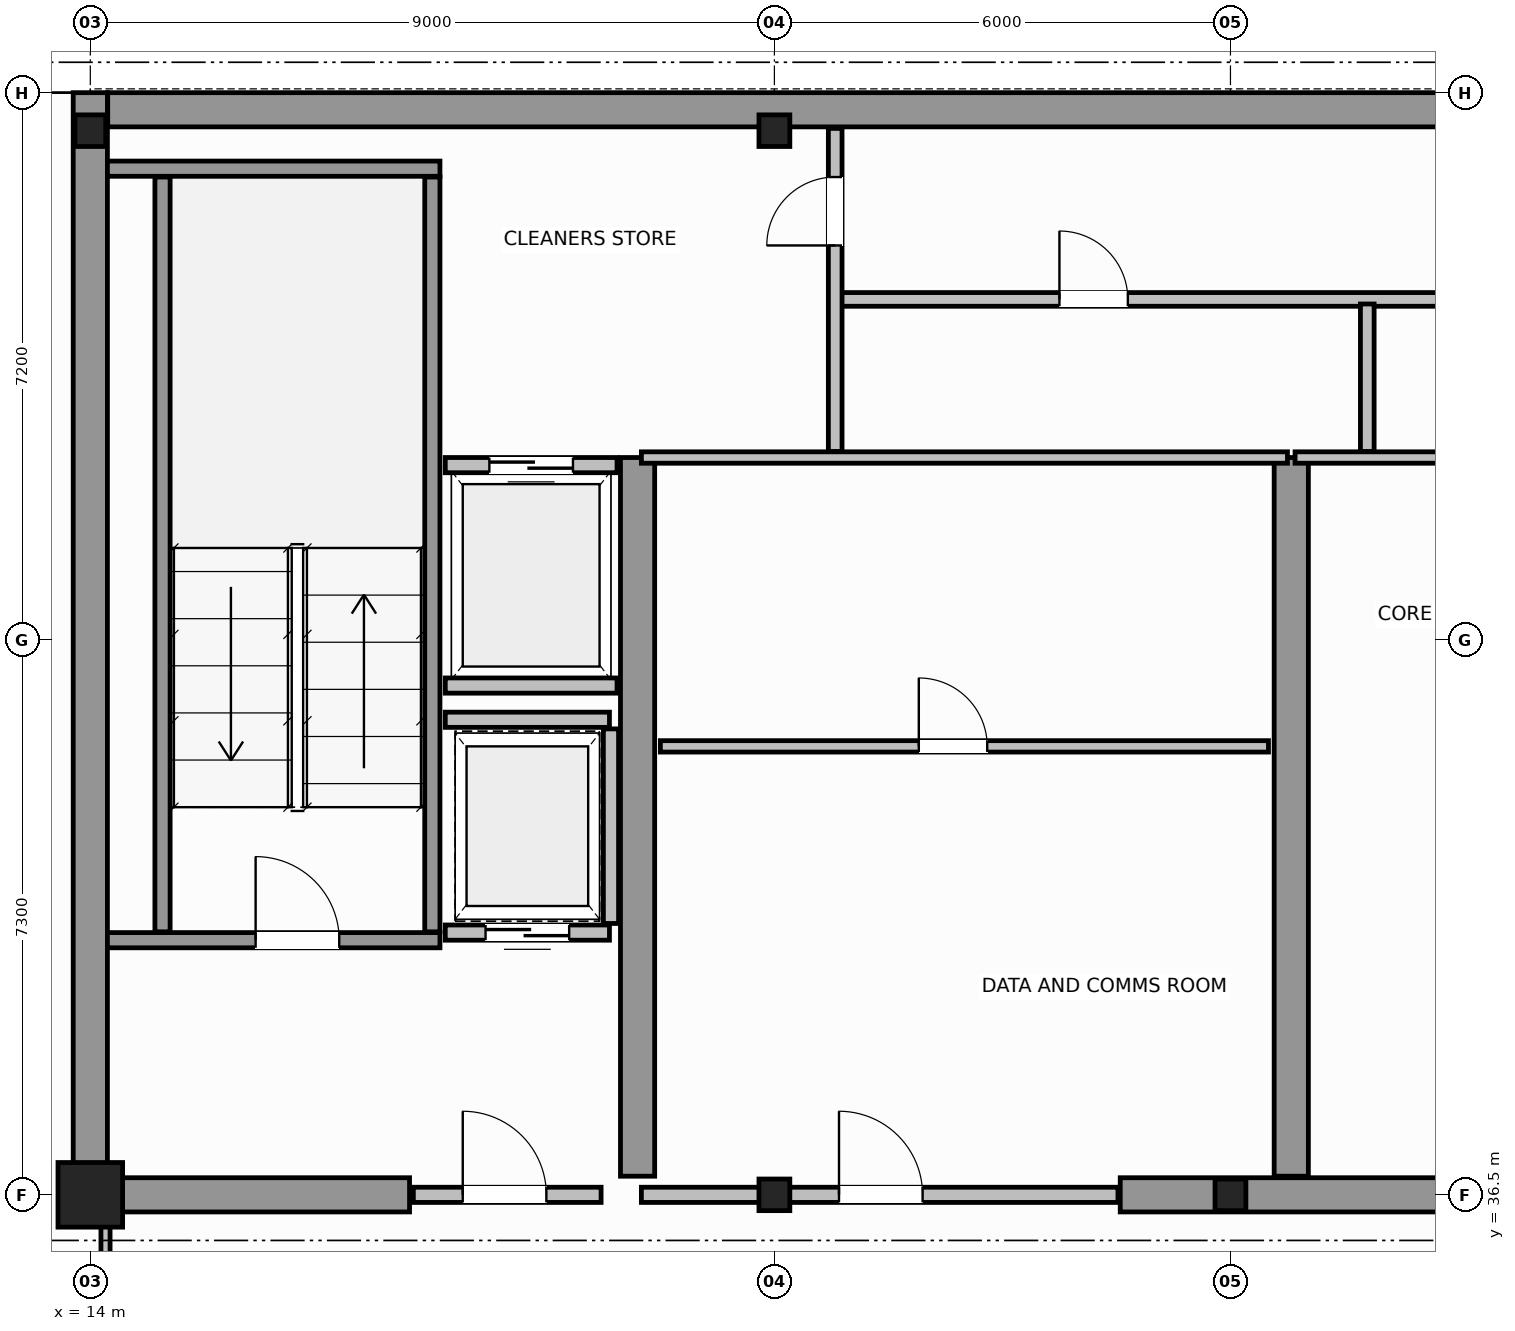
"""IFC4 building model, lengths in metres.
Left out: names, types, materials, properties, quantities, classifications, styles, units other than length and angle.
Written with IfcOpenShell. Run it as: python <this file> out.ifc"""

import sys

from ifc_helpers import new_model, si_unit, direction, frame, frame_2d, origin, origin_2d, place, context, subcontext, project, spatial, rectangle, i_section, extrude, source, transform, mapped, element, fill, save


model = new_model("IFC4")
c1 = context("Model", 3, precision=1e-05, world=origin(), true_north=direction((0.0, 1.0)))
c2 = subcontext(c1, "Body", "Model", "MODEL_VIEW")
j1 = project(units=[si_unit("LENGTHUNIT", "METRE"), si_unit("PLANEANGLEUNIT", "RADIAN")], contexts=[c1])
p1 = place(None, origin())
s1 = spatial("IfcSite", under=j1, at=p1, CompositionType="ELEMENT")
p2 = place(p1, origin())
s2 = spatial("IfcBuilding", under=s1, at=p2, CompositionType="ELEMENT")
p3 = place(p2, frame((0.0, 0.0, 291.6)))
s3 = spatial("IfcBuildingStorey", under=s2, at=p3, CompositionType="ELEMENT", Elevation=291.6)
m1 = source(origin(), c2, "Body", "SweptSolid", [
    extrude(rectangle(XDim=0.85, YDim=0.85, at=origin_2d()), origin(), (0.0, 0.0, 1.0), 3.8),
])
p4 = place(p3, frame((14.0, 36.5, 0.0), z_axis=(0.0, 0.0, 1.0), x_axis=(1.0, 0.0, 0.0)))
e1 = element("IfcColumn", 1, at=p4, inside=s3, PredefinedType="COLUMN", context=c2, shape_type="MappedRepresentation", body=[
    mapped(m1, transform((0.0, 0.0, 0.0), scale=1.0)),
])
m2 = source(origin(), c2, "Body", "SweptSolid", [
    extrude(i_section(OverallWidth=0.406, OverallDepth=0.416, WebThickness=0.03, FlangeThickness=0.042, FilletRadius=0.015, at=origin_2d()), origin(), (0.0, 0.0, 1.0), 3.8),
])
for number, where, z_axis, x_axis in (
    (2, (23.0, 36.5, 0.0), (0.0, 0.0, 1.0), (1.0, 0.0, 0.0)),
    (3, (29.0, 36.5, 0.0), (0.0, 0.0, 1.0), (1.0, 0.0, 0.0)),
    (4, (14.0, 50.5, 0.0), (0.0, 0.0, 1.0), (1.0, 0.0, 0.0)),
    (5, (23.0, 50.5, 0.0), (0.0, 0.0, 1.0), (1.0, 0.0, 0.0)),
):
    element("IfcColumn", number, at=place(p3, frame(where, z_axis=z_axis, x_axis=x_axis)), inside=s3, PredefinedType="COLUMN", context=c2, shape_type="MappedRepresentation", body=[
        mapped(m2, transform((0.0, 0.0, 0.0), scale=1.0)),
    ])
p5 = place(p3, frame((14.229, 50.775, 0.0), z_axis=(0.0, 0.0, 1.0), x_axis=(1.0, 0.0, 0.0)))
e6 = element("IfcWall", 6, at=p5, inside=s3, PredefinedType="SHEAR", context=c2, shape_type="SweptSolid", body=[
    extrude(rectangle(XDim=19.769, YDim=0.45, at=frame_2d((9.885, 0.0))), origin(), (0.0, 0.0, 1.0), 3.8),
])
p6 = place(p3, frame((14.0, 36.5, 0.0), z_axis=(0.0, 0.0, 1.0), x_axis=(0.0, 1.0, 0.0)))
e7 = element("IfcWall", 7, at=p6, inside=s3, PredefinedType="SHEAR", context=c2, shape_type="SweptSolid", body=[
    extrude(rectangle(XDim=14.5, YDim=0.45, at=frame_2d((7.25, 0.0))), origin(), (0.0, 0.0, 1.0), 3.8),
])
p7 = place(p3, frame((14.245, 36.5, 0.0), z_axis=(0.0, 0.0, 1.0), x_axis=(1.0, 0.0, 0.0)))
e8 = element("IfcWall", 8, at=p7, inside=s3, PredefinedType="SHEAR", context=c2, shape_type="SweptSolid", body=[
    extrude(rectangle(XDim=3.955, YDim=0.45, at=frame_2d((1.978, 0.0))), origin(), (0.0, 0.0, 1.0), 2.58),
])
p8 = place(p3, frame((27.55, 36.5, 0.0), z_axis=(0.0, 0.0, 1.0), x_axis=(1.0, 0.0, 0.0)))
e9 = element("IfcWall", 9, at=p8, inside=s3, PredefinedType="SHEAR", context=c2, shape_type="SweptSolid", body=[
    extrude(rectangle(XDim=4.5, YDim=0.45, at=frame_2d((2.25, 0.0))), origin(), (0.0, 0.0, 1.0), 3.8),
])
for number, where, z_axis, x_axis in (
    (10, (21.2, 36.745, 0.0), (0.0, 0.0, 1.0), (0.0, 1.0, 0.0)),
    (11, (29.8, 36.745, 0.0), (0.0, 0.0, 1.0), (0.0, 1.0, 0.0)),
):
    element("IfcWall", number, at=place(p3, frame(where, z_axis=z_axis, x_axis=x_axis)), inside=s3, PredefinedType="SHEAR", context=c2, shape_type="SweptSolid", body=[
        extrude(rectangle(XDim=9.455, YDim=0.45, at=frame_2d((4.728, 0.0))), origin(), (0.0, 0.0, 1.0), 3.8),
    ])
p9 = place(p3, frame((14.225, 39.85, 0.0), z_axis=(0.0, 0.0, 1.0), x_axis=(1.0, 0.0, 0.0)))
e12 = element("IfcWall", 12, at=p9, inside=s3, PredefinedType="SOLIDWALL", context=c2, shape_type="SweptSolid", body=[
    extrude(rectangle(XDim=4.375, YDim=0.2, at=frame_2d((2.188, 0.0))), origin(), (0.0, 0.0, 1.0), 3.8),
])
p10 = place(p9, frame((1.95, 0.0, 0.0)))
e13 = element("IfcOpeningElement", 13, at=p10, cuts=e12, PredefinedType="OPENING", context=c2, shape_type="SweptSolid", body=[
    extrude(rectangle(XDim=1.1, YDim=2.15, at=frame_2d((0.55, 1.075))), frame((0.0, 0.11, 0.0), z_axis=(0.0, -1.0, 0.0), x_axis=(1.0, 0.0, 0.0)), (0.0, 0.0, 1.0), 0.22),
])
p11 = place(p3, frame((14.225, 50.0, 0.0), z_axis=(0.0, 0.0, 1.0), x_axis=(1.0, 0.0, 0.0)))
e14 = element("IfcWall", 14, at=p11, inside=s3, PredefinedType="SOLIDWALL", context=c2, shape_type="SweptSolid", body=[
    extrude(rectangle(XDim=4.375, YDim=0.2, at=frame_2d((2.188, 0.0))), origin(), (0.0, 0.0, 1.0), 3.8),
])
for number, where, z_axis, x_axis in (
    (15, (14.95, 39.96, 0.0), (0.0, 0.0, 1.0), (0.0, 1.0, 0.0)),
    (16, (18.5, 39.96, 0.0), (0.0, 0.0, 1.0), (0.0, 1.0, 0.0)),
):
    element("IfcWall", number, at=place(p3, frame(where, z_axis=z_axis, x_axis=x_axis)), inside=s3, PredefinedType="SOLIDWALL", context=c2, shape_type="SweptSolid", body=[
        extrude(rectangle(XDim=9.93, YDim=0.2, at=frame_2d((4.965, 0.0))), origin(), (0.0, 0.0, 1.0), 3.8),
    ])
p12 = place(p3, frame((18.25, 36.5, 0.0), z_axis=(0.0, 0.0, 1.0), x_axis=(1.0, 0.0, 0.0)))
e17 = element("IfcWall", 17, at=p12, inside=s3, PredefinedType="SOLIDWALL", context=c2, shape_type="SweptSolid", body=[
    extrude(rectangle(XDim=2.47, YDim=0.2, at=frame_2d((1.235, 0.0))), origin(), (0.0, 0.0, 1.0), 2.57),
])
p13 = place(p12, frame((0.65, 0.0, 0.0)))
e18 = element("IfcOpeningElement", 18, at=p13, cuts=e17, PredefinedType="OPENING", context=c2, shape_type="SweptSolid", body=[
    extrude(rectangle(XDim=1.1, YDim=2.15, at=frame_2d((0.55, 1.075))), frame((0.0, 0.11, 0.0), z_axis=(0.0, -1.0, 0.0), x_axis=(1.0, 0.0, 0.0)), (0.0, 0.0, 1.0), 0.22),
])
p14 = place(p3, frame((18.67, 46.1, 0.0), z_axis=(0.0, 0.0, 1.0), x_axis=(1.0, 0.0, 0.0)))
e19 = element("IfcWall", 19, at=p14, inside=s3, PredefinedType="SOLIDWALL", context=c2, shape_type="SweptSolid", body=[
    extrude(rectangle(XDim=2.26, YDim=0.2, at=frame_2d((1.13, 0.0))), origin(), (0.0, 0.0, 1.0), 3.58),
])
p15 = place(p14, frame((0.58, 0.0, 0.0)))
e20 = element("IfcOpeningElement", 20, at=p15, cuts=e19, PredefinedType="OPENING", context=c2, shape_type="SweptSolid", body=[
    extrude(rectangle(XDim=1.1, YDim=2.15, at=frame_2d((0.55, 1.075))), frame((0.0, 0.11, 0.0), z_axis=(0.0, -1.0, 0.0), x_axis=(1.0, 0.0, 0.0)), (0.0, 0.0, 1.0), 0.22),
])
p16 = place(p3, frame((18.67, 43.2, 0.0), z_axis=(0.0, 0.0, 1.0), x_axis=(1.0, 0.0, 0.0)))
e21 = element("IfcWall", 21, at=p16, inside=s3, PredefinedType="SOLIDWALL", context=c2, shape_type="SweptSolid", body=[
    extrude(rectangle(XDim=2.26, YDim=0.2, at=frame_2d((1.13, 0.0))), origin(), (0.0, 0.0, 1.0), 3.58),
])
p17 = place(p3, frame((18.67, 39.95, 0.0), z_axis=(0.0, 0.0, 1.0), x_axis=(1.0, 0.0, 0.0)))
e22 = element("IfcWall", 22, at=p17, inside=s3, PredefinedType="SOLIDWALL", context=c2, shape_type="SweptSolid", body=[
    extrude(rectangle(XDim=2.16, YDim=0.2, at=frame_2d((1.08, 0.0))), origin(), (0.0, 0.0, 1.0), 3.58),
])
p18 = place(p17, frame((0.53, 0.0, 0.0)))
e23 = element("IfcOpeningElement", 23, at=p18, cuts=e22, PredefinedType="OPENING", context=c2, shape_type="SweptSolid", body=[
    extrude(rectangle(XDim=1.1, YDim=2.15, at=frame_2d((0.55, 1.075))), frame((0.0, 0.11, 0.0), z_axis=(0.0, -1.0, 0.0), x_axis=(1.0, 0.0, 0.0)), (0.0, 0.0, 1.0), 0.22),
])
p19 = place(p3, frame((18.67, 42.75, 0.0), z_axis=(0.0, 0.0, 1.0), x_axis=(1.0, 0.0, 0.0)))
e24 = element("IfcWall", 24, at=p19, inside=s3, PredefinedType="SOLIDWALL", context=c2, shape_type="SweptSolid", body=[
    extrude(rectangle(XDim=2.16, YDim=0.2, at=frame_2d((1.08, 0.0))), origin(), (0.0, 0.0, 1.0), 3.58),
])
p20 = place(p3, frame((20.85, 40.07, 0.0), z_axis=(0.0, 0.0, 1.0), x_axis=(0.0, 1.0, 0.0)))
e25 = element("IfcWall", 25, at=p20, inside=s3, PredefinedType="SOLIDWALL", context=c2, shape_type="SweptSolid", body=[
    extrude(rectangle(XDim=2.56, YDim=0.2, at=frame_2d((1.28, 0.0))), origin(), (0.0, 0.0, 1.0), 3.58),
])
p21 = place(p3, frame((21.25, 36.5, 0.0), z_axis=(0.0, 0.0, 1.0), x_axis=(1.0, 0.0, 0.0)))
e26 = element("IfcWall", 26, at=p21, inside=s3, PredefinedType="SOLIDWALL", context=c2, shape_type="SweptSolid", body=[
    extrude(rectangle(XDim=6.27, YDim=0.2, at=frame_2d((3.135, 0.0))), origin(), (0.0, 0.0, 1.0), 2.57),
])
p22 = place(p21, frame((2.6, 0.0, 0.0)))
e27 = element("IfcOpeningElement", 27, at=p22, cuts=e26, PredefinedType="OPENING", context=c2, shape_type="SweptSolid", body=[
    extrude(rectangle(XDim=1.1, YDim=2.15, at=frame_2d((0.55, 1.075))), frame((0.0, 0.11, 0.0), z_axis=(0.0, -1.0, 0.0), x_axis=(1.0, 0.0, 0.0)), (0.0, 0.0, 1.0), 0.22),
])
p23 = place(p3, frame((21.25, 46.2, 0.0), z_axis=(0.0, 0.0, 1.0), x_axis=(1.0, 0.0, 0.0)))
e28 = element("IfcWall", 28, at=p23, inside=s3, PredefinedType="PARTITIONING", context=c2, shape_type="SweptSolid", body=[
    extrude(rectangle(XDim=8.5, YDim=0.15, at=frame_2d((4.25, 0.0))), origin(), (0.0, 0.0, 1.0), 3.58),
])
p24 = place(p3, frame((21.5, 42.4, 0.0), z_axis=(0.0, 0.0, 1.0), x_axis=(1.0, 0.0, 0.0)))
e29 = element("IfcWall", 29, at=p24, inside=s3, PredefinedType="PARTITIONING", context=c2, shape_type="SweptSolid", body=[
    extrude(rectangle(XDim=8.0, YDim=0.15, at=frame_2d((4.0, 0.0))), origin(), (0.0, 0.0, 1.0), 3.58),
])
p25 = place(p24, frame((3.4, 0.0, 0.0)))
e30 = element("IfcOpeningElement", 30, at=p25, cuts=e29, PredefinedType="OPENING", context=c2, shape_type="SweptSolid", body=[
    extrude(rectangle(XDim=0.9, YDim=2.1, at=frame_2d((0.45, 1.05))), frame((0.0, 0.085, 0.0), z_axis=(0.0, -1.0, 0.0), x_axis=(1.0, 0.0, 0.0)), (0.0, 0.0, 1.0), 0.17),
])
p26 = place(p3, frame((29.85, 46.2, 0.0), z_axis=(0.0, 0.0, 1.0), x_axis=(1.0, 0.0, 0.0)))
e31 = element("IfcWall", 31, at=p26, inside=s3, PredefinedType="PARTITIONING", context=c2, shape_type="SweptSolid", body=[
    extrude(rectangle(XDim=8.5, YDim=0.15, at=frame_2d((4.25, 0.0))), origin(), (0.0, 0.0, 1.0), 3.58),
])
p27 = place(p3, frame((23.85, 48.28, 0.0), z_axis=(0.0, 0.0, 1.0), x_axis=(1.0, 0.0, 0.0)))
e32 = element("IfcWall", 32, at=p27, inside=s3, PredefinedType="PLUMBINGWALL", context=c2, shape_type="SweptSolid", body=[
    extrude(rectangle(XDim=15.03, YDim=0.18, at=frame_2d((7.515, 0.0))), origin(), (0.0, 0.0, 1.0), 3.58),
])
p28 = place(p27, frame((2.9, 0.0, 0.0)))
e33 = element("IfcOpeningElement", 33, at=p28, cuts=e32, PredefinedType="OPENING", context=c2, shape_type="SweptSolid", body=[
    extrude(rectangle(XDim=0.9, YDim=2.15, at=frame_2d((0.45, 1.075))), frame((0.0, 0.1, 0.0), z_axis=(0.0, -1.0, 0.0), x_axis=(1.0, 0.0, 0.0)), (0.0, 0.0, 1.0), 0.2),
])
p29 = place(p27, frame((10.4, 0.0, 0.0)))
e34 = element("IfcOpeningElement", 34, at=p29, cuts=e32, PredefinedType="OPENING", context=c2, shape_type="SweptSolid", body=[
    extrude(rectangle(XDim=0.9, YDim=2.15, at=frame_2d((0.45, 1.075))), frame((0.0, 0.1, 0.0), z_axis=(0.0, -1.0, 0.0), x_axis=(1.0, 0.0, 0.0)), (0.0, 0.0, 1.0), 0.2),
])
p30 = place(p3, frame((23.8, 46.28, 0.0), z_axis=(0.0, 0.0, 1.0), x_axis=(0.0, 1.0, 0.0)))
e35 = element("IfcWall", 35, at=p30, inside=s3, PredefinedType="PLUMBINGWALL", context=c2, shape_type="SweptSolid", body=[
    extrude(rectangle(XDim=4.25, YDim=0.18, at=frame_2d((2.125, 0.0))), origin(), (0.0, 0.0, 1.0), 3.58),
])
p31 = place(p30, frame((2.71, 0.0, 0.0)))
e36 = element("IfcOpeningElement", 36, at=p31, cuts=e35, PredefinedType="OPENING", context=c2, shape_type="SweptSolid", body=[
    extrude(rectangle(XDim=0.9, YDim=2.15, at=frame_2d((0.45, 1.075))), frame((0.0, 0.1, 0.0), z_axis=(0.0, -1.0, 0.0), x_axis=(1.0, 0.0, 0.0)), (0.0, 0.0, 1.0), 0.2),
])
p32 = place(p3, frame((30.8, 46.28, 0.0), z_axis=(0.0, 0.0, 1.0), x_axis=(0.0, 1.0, 0.0)))
e37 = element("IfcWall", 37, at=p32, inside=s3, PredefinedType="PLUMBINGWALL", context=c2, shape_type="SweptSolid", body=[
    extrude(rectangle(XDim=1.94, YDim=0.18, at=frame_2d((0.97, 0.0))), origin(), (0.0, 0.0, 1.0), 3.58),
])
p33 = place(p3, frame((14.2, 34.0, 0.0), z_axis=(0.0, 0.0, 1.0), x_axis=(0.0, 1.0, 0.0)))
e38 = element("IfcWall", 38, at=p33, inside=s3, PredefinedType="PARTITIONING", context=c2, shape_type="SweptSolid", body=[
    extrude(rectangle(XDim=2.44, YDim=0.12, at=frame_2d((1.22, 0.0))), origin(), (0.0, 0.0, 1.0), 3.58),
])
p34 = place(p33, frame((0.7, 0.0, 0.0)))
e39 = element("IfcOpeningElement", 39, at=p34, cuts=e38, PredefinedType="OPENING", context=c2, shape_type="SweptSolid", body=[
    extrude(rectangle(XDim=0.9, YDim=2.15, at=frame_2d((0.45, 1.075))), frame((0.0, 0.07, 0.0), z_axis=(0.0, -1.0, 0.0), x_axis=(1.0, 0.0, 0.0)), (0.0, 0.0, 1.0), 0.14),
])
m3 = source(origin(), c2, "Body", "SweptSolid", [
    extrude(rectangle(XDim=1.1, YDim=2.15, at=frame_2d((0.55, 1.075))), frame((0.0, 0.025, 0.0), z_axis=(0.0, -1.0, 0.0), x_axis=(1.0, 0.0, 0.0)), (0.0, 0.0, 1.0), 0.05),
])
p35 = place(p10, origin())
e40 = element("IfcDoor", 40, at=p35, inside=s3, OperationType="SINGLE_SWING_LEFT", PredefinedType="DOOR", context=c2, shape_type="MappedRepresentation", body=[
    mapped(m3, transform((0.0, 0.0, 0.0), scale=1.0)),
])
fill(e13, e40)
p36 = place(p13, origin())
e41 = element("IfcDoor", 41, at=p36, inside=s3, OperationType="SINGLE_SWING_RIGHT", PredefinedType="DOOR", context=c2, shape_type="MappedRepresentation", body=[
    mapped(m3, transform((0.0, 0.0, 0.0), scale=1.0)),
])
fill(e18, e41)
p37 = place(p15, origin())
e42 = element("IfcDoor", 42, at=p37, inside=s3, OperationType="DOUBLE_DOOR_SLIDING", PredefinedType="DOOR", context=c2, shape_type="MappedRepresentation", body=[
    mapped(m3, transform((0.0, 0.0, 0.0), scale=1.0)),
])
fill(e20, e42)
p38 = place(p18, origin())
e43 = element("IfcDoor", 43, at=p38, inside=s3, OperationType="DOUBLE_DOOR_SLIDING", PredefinedType="DOOR", context=c2, shape_type="MappedRepresentation", body=[
    mapped(m3, transform((0.0, 0.0, 0.0), scale=1.0)),
])
fill(e23, e43)
p39 = place(p22, origin())
e44 = element("IfcDoor", 44, at=p39, inside=s3, OperationType="SINGLE_SWING_LEFT", PredefinedType="DOOR", context=c2, shape_type="MappedRepresentation", body=[
    mapped(m3, transform((0.0, 0.0, 0.0), scale=1.0)),
])
fill(e27, e44)
m4 = source(origin(), c2, "Body", "SweptSolid", [
    extrude(rectangle(XDim=0.9, YDim=2.1, at=frame_2d((0.45, 1.05))), frame((0.0, 0.025, 0.0), z_axis=(0.0, -1.0, 0.0), x_axis=(1.0, 0.0, 0.0)), (0.0, 0.0, 1.0), 0.05),
])
p40 = place(p25, origin())
e45 = element("IfcDoor", 45, at=p40, inside=s3, OperationType="SINGLE_SWING_RIGHT", PredefinedType="DOOR", context=c2, shape_type="MappedRepresentation", body=[
    mapped(m4, transform((0.0, 0.0, 0.0), scale=1.0)),
])
fill(e30, e45)
m5 = source(origin(), c2, "Body", "SweptSolid", [
    extrude(rectangle(XDim=0.9, YDim=2.15, at=frame_2d((0.45, 1.075))), frame((0.0, 0.025, 0.0), z_axis=(0.0, -1.0, 0.0), x_axis=(1.0, 0.0, 0.0)), (0.0, 0.0, 1.0), 0.05),
])
p41 = place(p31, origin())
e46 = element("IfcDoor", 46, at=p41, inside=s3, OperationType="SINGLE_SWING_LEFT", PredefinedType="DOOR", context=c2, shape_type="MappedRepresentation", body=[
    mapped(m5, transform((0.0, 0.0, 0.0), scale=1.0)),
])
fill(e36, e46)
p42 = place(p28, origin())
e47 = element("IfcDoor", 47, at=p42, inside=s3, OperationType="SINGLE_SWING_RIGHT", PredefinedType="DOOR", context=c2, shape_type="MappedRepresentation", body=[
    mapped(m5, transform((0.0, 0.0, 0.0), scale=1.0)),
])
fill(e33, e47)
save(model, sys.argv[1])
